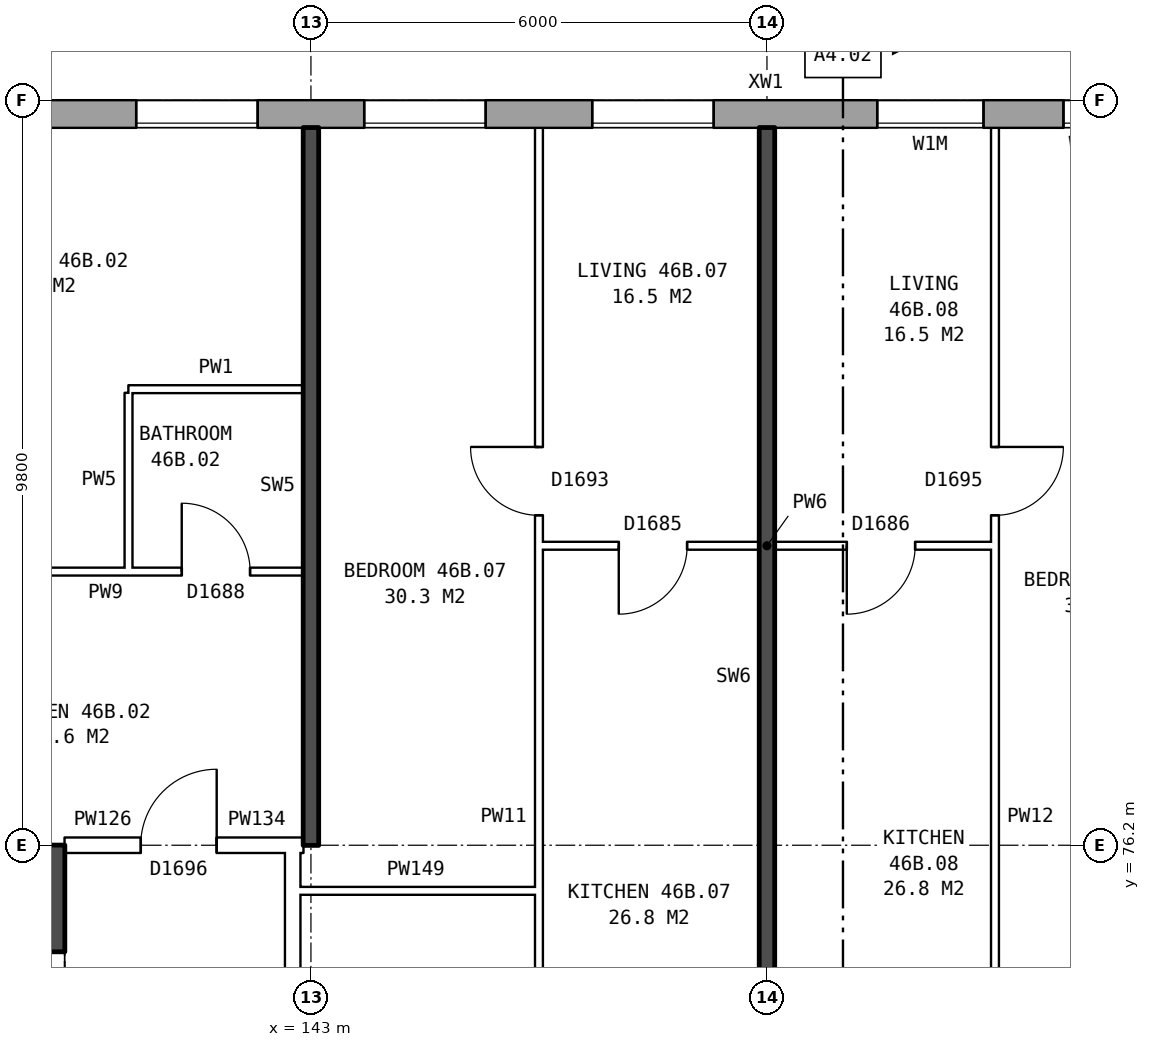
"""IFC4 building model, lengths in metres.
Left out: names, types, materials, properties, quantities, classifications, styles, units other than length and angle.
Written with IfcOpenShell. Run it as: python <this file> out.ifc"""

import sys

from ifc_helpers import new_model, si_unit, direction, frame, frame_2d, origin, place, context, subcontext, project, spatial, rectangle, extrude, element, fill, save


model = new_model("IFC4")
c1 = context("Model", 3, precision=1e-05, world=origin(), true_north=direction((0.0, 1.0)))
c2 = subcontext(c1, "Body", "Model", "MODEL_VIEW")
j1 = project(units=[si_unit("LENGTHUNIT", "METRE"), si_unit("PLANEANGLEUNIT", "RADIAN")], contexts=[c1])
p1 = place(None, origin())
s1 = spatial("IfcSite", under=j1, at=p1, CompositionType="ELEMENT")
p2 = place(p1, origin())
s2 = spatial("IfcBuilding", under=s1, at=p2, CompositionType="ELEMENT")
p3 = place(p2, frame((0.0, 0.0, 164.0)))
s3 = spatial("IfcBuildingStorey", under=s2, at=p3, CompositionType="ELEMENT", Elevation=164.0)
p4 = place(p3, frame((168.425, 85.82, 0.0), z_axis=(0.0, 0.0, 1.0), x_axis=(-1.0, 0.0, 0.0)))
e1 = element("IfcWall", 1, at=p4, inside=s3, PredefinedType="STANDARD", context=c2, shape_type="SweptSolid", body=[
    extrude(rectangle(XDim=34.351, YDim=0.36, at=frame_2d((17.175, 0.0))), origin(), (0.0, 0.0, 1.0), 2.85),
])
p5 = place(p4, frame((2.125, 0.0, 0.8)))
e2 = element("IfcOpeningElement", 2, at=p5, cuts=e1, PredefinedType="OPENING", context=c2, shape_type="SweptSolid", body=[
    extrude(rectangle(XDim=1.6, YDim=1.8, at=frame_2d((0.8, 0.9))), frame((0.0, 0.19, 0.0), z_axis=(0.0, -1.0, 0.0), x_axis=(1.0, 0.0, 0.0)), (0.0, 0.0, 1.0), 0.38),
])
p6 = place(p4, frame((5.125, 0.0, 0.8)))
e3 = element("IfcOpeningElement", 3, at=p6, cuts=e1, PredefinedType="OPENING", context=c2, shape_type="SweptSolid", body=[
    extrude(rectangle(XDim=1.6, YDim=1.8, at=frame_2d((0.8, 0.9))), frame((0.0, 0.19, 0.0), z_axis=(0.0, -1.0, 0.0), x_axis=(1.0, 0.0, 0.0)), (0.0, 0.0, 1.0), 0.38),
])
p7 = place(p4, frame((8.125, 0.0, 0.8)))
e4 = element("IfcOpeningElement", 4, at=p7, cuts=e1, PredefinedType="OPENING", context=c2, shape_type="SweptSolid", body=[
    extrude(rectangle(XDim=1.6, YDim=1.8, at=frame_2d((0.8, 0.9))), frame((0.0, 0.19, 0.0), z_axis=(0.0, -1.0, 0.0), x_axis=(1.0, 0.0, 0.0)), (0.0, 0.0, 1.0), 0.38),
])
p8 = place(p4, frame((11.125, 0.0, 0.8)))
e5 = element("IfcOpeningElement", 5, at=p8, cuts=e1, PredefinedType="OPENING", context=c2, shape_type="SweptSolid", body=[
    extrude(rectangle(XDim=1.6, YDim=1.8, at=frame_2d((0.8, 0.9))), frame((0.0, 0.19, 0.0), z_axis=(0.0, -1.0, 0.0), x_axis=(1.0, 0.0, 0.0)), (0.0, 0.0, 1.0), 0.38),
])
p9 = place(p4, frame((13.625, 0.0, 0.9)))
e6 = element("IfcOpeningElement", 6, at=p9, cuts=e1, PredefinedType="OPENING", context=c2, shape_type="SweptSolid", body=[
    extrude(rectangle(XDim=1.0, YDim=1.5, at=frame_2d((0.5, 0.75))), frame((0.0, 0.19, 0.0), z_axis=(0.0, -1.0, 0.0), x_axis=(1.0, 0.0, 0.0)), (0.0, 0.0, 1.0), 0.38),
])
p10 = place(p4, frame((16.575, 0.0, 0.25)))
e7 = element("IfcOpeningElement", 7, at=p10, cuts=e1, PredefinedType="OPENING", context=c2, shape_type="SweptSolid", body=[
    extrude(rectangle(XDim=1.4, YDim=1.2, at=frame_2d((0.7, 0.6))), frame((0.0, 0.19, 0.0), z_axis=(0.0, -1.0, 0.0), x_axis=(1.0, 0.0, 0.0)), (0.0, 0.0, 1.0), 0.38),
])
p11 = place(p4, frame((20.125, 0.0, 0.8)))
e8 = element("IfcOpeningElement", 8, at=p11, cuts=e1, PredefinedType="OPENING", context=c2, shape_type="SweptSolid", body=[
    extrude(rectangle(XDim=1.6, YDim=1.8, at=frame_2d((0.8, 0.9))), frame((0.0, 0.19, 0.0), z_axis=(0.0, -1.0, 0.0), x_axis=(1.0, 0.0, 0.0)), (0.0, 0.0, 1.0), 0.38),
])
p12 = place(p4, frame((23.125, 0.0, 0.8)))
e9 = element("IfcOpeningElement", 9, at=p12, cuts=e1, PredefinedType="OPENING", context=c2, shape_type="SweptSolid", body=[
    extrude(rectangle(XDim=1.6, YDim=1.8, at=frame_2d((0.8, 0.9))), frame((0.0, 0.19, 0.0), z_axis=(0.0, -1.0, 0.0), x_axis=(1.0, 0.0, 0.0)), (0.0, 0.0, 1.0), 0.38),
])
p13 = place(p4, frame((26.125, 0.0, 0.8)))
e10 = element("IfcOpeningElement", 10, at=p13, cuts=e1, PredefinedType="OPENING", context=c2, shape_type="SweptSolid", body=[
    extrude(rectangle(XDim=1.6, YDim=1.8, at=frame_2d((0.8, 0.9))), frame((0.0, 0.19, 0.0), z_axis=(0.0, -1.0, 0.0), x_axis=(1.0, 0.0, 0.0)), (0.0, 0.0, 1.0), 0.38),
])
p14 = place(p4, frame((29.125, 0.0, 0.8)))
e11 = element("IfcOpeningElement", 11, at=p14, cuts=e1, PredefinedType="OPENING", context=c2, shape_type="SweptSolid", body=[
    extrude(rectangle(XDim=1.6, YDim=1.8, at=frame_2d((0.8, 0.9))), frame((0.0, 0.19, 0.0), z_axis=(0.0, -1.0, 0.0), x_axis=(1.0, 0.0, 0.0)), (0.0, 0.0, 1.0), 0.38),
])
p15 = place(p4, frame((32.125, 0.0, 0.8)))
e12 = element("IfcOpeningElement", 12, at=p15, cuts=e1, PredefinedType="OPENING", context=c2, shape_type="SweptSolid", body=[
    extrude(rectangle(XDim=1.6, YDim=1.8, at=frame_2d((0.8, 0.9))), frame((0.0, 0.19, 0.0), z_axis=(0.0, -1.0, 0.0), x_axis=(1.0, 0.0, 0.0)), (0.0, 0.0, 1.0), 0.38),
])
p16 = place(p4, frame((14.925, 0.0, 1.7)))
e13 = element("IfcOpeningElement", 13, at=p16, cuts=e1, PredefinedType="OPENING", context=c2, shape_type="SweptSolid", body=[
    extrude(rectangle(XDim=0.6, YDim=0.9, at=frame_2d((0.3, 0.45))), frame((0.0, 0.19, 0.0), z_axis=(0.0, -1.0, 0.0), x_axis=(1.0, 0.0, 0.0)), (0.0, 0.0, 1.0), 0.38),
])
p17 = place(p3, frame((139.51, 63.8, 0.0), z_axis=(0.0, 0.0, 1.0), x_axis=(0.0, 1.0, 0.0)))
e14 = element("IfcWall", 14, at=p17, inside=s3, PredefinedType="SHEAR", context=c2, shape_type="SweptSolid", body=[
    extrude(rectangle(XDim=12.4, YDim=0.5, at=frame_2d((6.2, 0.0))), origin(), (0.0, 0.0, 1.0), 2.85),
])
p18 = place(p17, frame((1.325, 0.0, 0.0)))
e15 = element("IfcOpeningElement", 15, at=p18, cuts=e14, PredefinedType="OPENING", context=c2, shape_type="SweptSolid", body=[
    extrude(rectangle(XDim=1.1, YDim=2.1, at=frame_2d((0.55, 1.05))), frame((0.0, 0.26, 0.0), z_axis=(0.0, -1.0, 0.0), x_axis=(1.0, 0.0, 0.0)), (0.0, 0.0, 1.0), 0.52),
])
p19 = place(p17, frame((3.6, 0.0, 0.0)))
e16 = element("IfcOpeningElement", 16, at=p19, cuts=e14, PredefinedType="OPENING", context=c2, shape_type="SweptSolid", body=[
    extrude(rectangle(XDim=1.1, YDim=2.1, at=frame_2d((0.55, 1.05))), frame((0.0, 0.26, 0.0), z_axis=(0.0, -1.0, 0.0), x_axis=(1.0, 0.0, 0.0)), (0.0, 0.0, 1.0), 0.52),
])
p20 = place(p17, frame((5.8, 0.0, 0.0)))
e17 = element("IfcOpeningElement", 17, at=p20, cuts=e14, PredefinedType="OPENING", context=c2, shape_type="SweptSolid", body=[
    extrude(rectangle(XDim=1.1, YDim=2.1, at=frame_2d((0.55, 1.05))), frame((0.0, 0.26, 0.0), z_axis=(0.0, -1.0, 0.0), x_axis=(1.0, 0.0, 0.0)), (0.0, 0.0, 1.0), 0.52),
])
p21 = place(p17, frame((9.9, 0.0, 0.0)))
e18 = element("IfcOpeningElement", 18, at=p21, cuts=e14, PredefinedType="OPENING", context=c2, shape_type="SweptSolid", body=[
    extrude(rectangle(XDim=1.1, YDim=2.1, at=frame_2d((0.55, 1.05))), frame((0.0, 0.26, 0.0), z_axis=(0.0, -1.0, 0.0), x_axis=(1.0, 0.0, 0.0)), (0.0, 0.0, 1.0), 0.52),
])
p22 = place(p17, frame((8.125, 0.0, 0.0)))
e19 = element("IfcOpeningElement", 19, at=p22, cuts=e14, PredefinedType="OPENING", context=c2, shape_type="SweptSolid", body=[
    extrude(rectangle(XDim=0.85, YDim=2.1, at=frame_2d((0.425, 1.05))), frame((0.0, 0.26, 0.0), z_axis=(0.0, -1.0, 0.0), x_axis=(1.0, 0.0, 0.0)), (0.0, 0.0, 1.0), 0.52),
])
p23 = place(p3, frame((142.76, 63.9, 0.0), z_axis=(0.0, 0.0, 1.0), x_axis=(0.0, 1.0, 0.0)))
e20 = element("IfcWall", 20, at=p23, inside=s3, PredefinedType="PARTITIONING", context=c2, shape_type="SweptSolid", body=[
    extrude(rectangle(XDim=12.2, YDim=0.2, at=frame_2d((6.1, 0.0))), origin(), (0.0, 0.0, 1.0), 2.85),
])
p24 = place(p23, frame((5.1, 0.0, 0.0)))
e21 = element("IfcOpeningElement", 21, at=p24, cuts=e20, PredefinedType="OPENING", context=c2, shape_type="SweptSolid", body=[
    extrude(rectangle(XDim=2.0, YDim=2.1, at=frame_2d((1.0, 1.05))), frame((0.0, 0.11, 0.0), z_axis=(0.0, -1.0, 0.0), x_axis=(1.0, 0.0, 0.0)), (0.0, 0.0, 1.0), 0.22),
])
p25 = place(p3, frame((142.76, 75.6, 0.0), z_axis=(0.0, 0.0, 1.0), x_axis=(1.0, 0.0, 0.0)))
e22 = element("IfcWall", 22, at=p25, inside=s3, PredefinedType="PARTITIONING", context=c2, shape_type="SweptSolid", body=[
    extrude(rectangle(XDim=3.24, YDim=0.1, at=frame_2d((1.62, 0.0))), origin(), (0.0, 0.0, 1.0), 2.85),
])
p26 = place(p3, frame((139.76, 76.2, 0.0), z_axis=(0.0, 0.0, 1.0), x_axis=(1.0, 0.0, 0.0)))
e23 = element("IfcWall", 23, at=p26, inside=s3, PredefinedType="PARTITIONING", context=c2, shape_type="SweptSolid", body=[
    extrude(rectangle(XDim=3.0, YDim=0.2, at=frame_2d((1.5, 0.0))), origin(), (0.0, 0.0, 1.0), 2.85),
])
p27 = place(p26, frame((1.0, 0.0, 0.0)))
e24 = element("IfcOpeningElement", 24, at=p27, cuts=e23, PredefinedType="OPENING", context=c2, shape_type="SweptSolid", body=[
    extrude(rectangle(XDim=1.0, YDim=2.1, at=frame_2d((0.5, 1.05))), frame((0.0, 0.11, 0.0), z_axis=(0.0, -1.0, 0.0), x_axis=(1.0, 0.0, 0.0)), (0.0, 0.0, 1.0), 0.22),
])
p28 = place(p3, frame((142.76, 76.2, 0.0), z_axis=(0.0, 0.0, 1.0), x_axis=(1.0, 0.0, 0.0)))
e25 = element("IfcWall", 25, at=p28, inside=s3, PredefinedType="PARTITIONING", context=c2, shape_type="SweptSolid", body=[
    extrude(rectangle(XDim=0.14, YDim=0.2, at=frame_2d((0.07, 0.0))), origin(), (0.0, 0.0, 1.0), 2.85),
])
p29 = place(p3, frame((137.1, 79.8, 0.0), z_axis=(0.0, 0.0, 1.0), x_axis=(1.0, 0.0, 0.0)))
e26 = element("IfcWall", 26, at=p29, inside=s3, PredefinedType="PARTITIONING", context=c2, shape_type="SweptSolid", body=[
    extrude(rectangle(XDim=5.8, YDim=0.1, at=frame_2d((2.9, 0.0))), origin(), (0.0, 0.0, 1.0), 2.85),
])
p30 = place(p29, frame((1.3, 0.0, 0.0)))
e27 = element("IfcOpeningElement", 27, at=p30, cuts=e26, PredefinedType="OPENING", context=c2, shape_type="SweptSolid", body=[
    extrude(rectangle(XDim=0.9, YDim=2.1, at=frame_2d((0.45, 1.05))), frame((0.0, 0.06, 0.0), z_axis=(0.0, -1.0, 0.0), x_axis=(1.0, 0.0, 0.0)), (0.0, 0.0, 1.0), 0.12),
])
p31 = place(p29, frame((4.2, 0.0, 0.0)))
e28 = element("IfcOpeningElement", 28, at=p31, cuts=e26, PredefinedType="OPENING", context=c2, shape_type="SweptSolid", body=[
    extrude(rectangle(XDim=0.9, YDim=2.1, at=frame_2d((0.45, 1.05))), frame((0.0, 0.06, 0.0), z_axis=(0.0, -1.0, 0.0), x_axis=(1.0, 0.0, 0.0)), (0.0, 0.0, 1.0), 0.12),
])
p32 = place(p3, frame((146.0, 80.14, 0.0), z_axis=(0.0, 0.0, 1.0), x_axis=(1.0, 0.0, 0.0)))
e29 = element("IfcWall", 29, at=p32, inside=s3, PredefinedType="PARTITIONING", context=c2, shape_type="SweptSolid", body=[
    extrude(rectangle(XDim=6.0, YDim=0.1, at=frame_2d((3.0, 0.0))), origin(), (0.0, 0.0, 1.0), 2.85),
])
p33 = place(p32, frame((1.05, 0.0, 0.0)))
e30 = element("IfcOpeningElement", 30, at=p33, cuts=e29, PredefinedType="OPENING", context=c2, shape_type="SweptSolid", body=[
    extrude(rectangle(XDim=0.9, YDim=2.1, at=frame_2d((0.45, 1.05))), frame((0.0, 0.06, 0.0), z_axis=(0.0, -1.0, 0.0), x_axis=(1.0, 0.0, 0.0)), (0.0, 0.0, 1.0), 0.12),
])
p34 = place(p32, frame((4.05, 0.0, 0.0)))
e31 = element("IfcOpeningElement", 31, at=p34, cuts=e29, PredefinedType="OPENING", context=c2, shape_type="SweptSolid", body=[
    extrude(rectangle(XDim=0.9, YDim=2.1, at=frame_2d((0.45, 1.05))), frame((0.0, 0.06, 0.0), z_axis=(0.0, -1.0, 0.0), x_axis=(1.0, 0.0, 0.0)), (0.0, 0.0, 1.0), 0.12),
])
for number, where, z_axis, x_axis in (
    (32, (140.6, 82.2, 0.0), (0.0, 0.0, 1.0), (1.0, 0.0, 0.0)),
    (33, (140.6, 79.85, 0.0), (0.0, 0.0, 1.0), (0.0, 1.0, 0.0)),
):
    element("IfcWall", number, at=place(p3, frame(where, z_axis=z_axis, x_axis=x_axis)), inside=s3, PredefinedType="PARTITIONING", context=c2, shape_type="SweptSolid", body=[
        extrude(rectangle(XDim=2.3, YDim=0.1, at=frame_2d((1.15, 0.0))), origin(), (0.0, 0.0, 1.0), 2.85),
    ])
p35 = place(p3, frame((143.0, 76.2, 0.0), z_axis=(0.0, 0.0, 1.0), x_axis=(0.0, 1.0, 0.0)))
e34 = element("IfcWall", 34, at=p35, inside=s3, PredefinedType="SOLIDWALL", context=c2, shape_type="SweptSolid", body=[
    extrude(rectangle(XDim=9.44, YDim=0.2, at=frame_2d((4.72, 0.0))), origin(), (0.0, 0.0, 1.0), 2.85),
])
p36 = place(p3, frame((146.0, 71.3, 0.0), z_axis=(0.0, 0.0, 1.0), x_axis=(0.0, 1.0, 0.0)))
e35 = element("IfcWall", 35, at=p36, inside=s3, PredefinedType="PARTITIONING", context=c2, shape_type="SweptSolid", body=[
    extrude(rectangle(XDim=14.34, YDim=0.1, at=frame_2d((7.17, 0.0))), origin(), (0.0, 0.0, 1.0), 2.85),
])
p37 = place(p36, frame((9.24, 0.0, 0.0)))
e36 = element("IfcOpeningElement", 36, at=p37, cuts=e35, PredefinedType="OPENING", context=c2, shape_type="SweptSolid", body=[
    extrude(rectangle(XDim=0.9, YDim=2.1, at=frame_2d((0.45, 1.05))), frame((0.0, 0.06, 0.0), z_axis=(0.0, -1.0, 0.0), x_axis=(1.0, 0.0, 0.0)), (0.0, 0.0, 1.0), 0.12),
])
p38 = place(p36, frame((0.4, 0.0, 0.0)))
e37 = element("IfcOpeningElement", 37, at=p38, cuts=e35, PredefinedType="OPENING", context=c2, shape_type="SweptSolid", body=[
    extrude(rectangle(XDim=0.9, YDim=2.1, at=frame_2d((0.45, 1.05))), frame((0.0, 0.06, 0.0), z_axis=(0.0, -1.0, 0.0), x_axis=(1.0, 0.0, 0.0)), (0.0, 0.0, 1.0), 0.12),
])
p39 = place(p3, frame((149.0, 71.2, 0.0), z_axis=(0.0, 0.0, 1.0), x_axis=(0.0, 1.0, 0.0)))
e38 = element("IfcWall", 38, at=p39, inside=s3, PredefinedType="SOLIDWALL", context=c2, shape_type="SweptSolid", body=[
    extrude(rectangle(XDim=14.44, YDim=0.2, at=frame_2d((7.22, 0.0))), origin(), (0.0, 0.0, 1.0), 2.85),
])
p40 = place(p3, frame((152.0, 71.3, 0.0), z_axis=(0.0, 0.0, 1.0), x_axis=(0.0, 1.0, 0.0)))
e39 = element("IfcWall", 39, at=p40, inside=s3, PredefinedType="PARTITIONING", context=c2, shape_type="SweptSolid", body=[
    extrude(rectangle(XDim=14.34, YDim=0.1, at=frame_2d((7.17, 0.0))), origin(), (0.0, 0.0, 1.0), 2.85),
])
p41 = place(p40, frame((9.24, 0.0, 0.0)))
e40 = element("IfcOpeningElement", 40, at=p41, cuts=e39, PredefinedType="OPENING", context=c2, shape_type="SweptSolid", body=[
    extrude(rectangle(XDim=0.9, YDim=2.1, at=frame_2d((0.45, 1.05))), frame((0.0, 0.06, 0.0), z_axis=(0.0, -1.0, 0.0), x_axis=(1.0, 0.0, 0.0)), (0.0, 0.0, 1.0), 0.12),
])
p42 = place(p40, frame((0.4, 0.0, 0.0)))
e41 = element("IfcOpeningElement", 41, at=p42, cuts=e39, PredefinedType="OPENING", context=c2, shape_type="SweptSolid", body=[
    extrude(rectangle(XDim=0.9, YDim=2.1, at=frame_2d((0.45, 1.05))), frame((0.0, 0.06, 0.0), z_axis=(0.0, -1.0, 0.0), x_axis=(1.0, 0.0, 0.0)), (0.0, 0.0, 1.0), 0.12),
])
p43 = place(p10, origin())
e42 = element("IfcWindow", 42, at=p43, inside=s3, PartitioningType="SINGLE_PANEL", PredefinedType="WINDOW", context=c2, shape_type="SweptSolid", body=[
    extrude(rectangle(XDim=1.4, YDim=1.2, at=frame_2d((0.7, 0.6))), frame((0.0, 0.15, 0.0), z_axis=(0.0, -1.0, 0.0), x_axis=(1.0, 0.0, 0.0)), (0.0, 0.0, 1.0), 0.06),
])
fill(e7, e42)
p44 = place(p11, origin())
e43 = element("IfcWindow", 43, at=p44, inside=s3, PartitioningType="SINGLE_PANEL", PredefinedType="WINDOW", context=c2, shape_type="SweptSolid", body=[
    extrude(rectangle(XDim=1.6, YDim=1.8, at=frame_2d((0.8, 0.9))), frame((0.0, 0.15, 0.0), z_axis=(0.0, -1.0, 0.0), x_axis=(1.0, 0.0, 0.0)), (0.0, 0.0, 1.0), 0.06),
])
fill(e8, e43)
p45 = place(p12, origin())
e44 = element("IfcWindow", 44, at=p45, inside=s3, PartitioningType="SINGLE_PANEL", PredefinedType="WINDOW", context=c2, shape_type="SweptSolid", body=[
    extrude(rectangle(XDim=1.6, YDim=1.8, at=frame_2d((0.8, 0.9))), frame((0.0, 0.15, 0.0), z_axis=(0.0, -1.0, 0.0), x_axis=(1.0, 0.0, 0.0)), (0.0, 0.0, 1.0), 0.06),
])
fill(e9, e44)
p46 = place(p13, origin())
e45 = element("IfcWindow", 45, at=p46, inside=s3, PartitioningType="SINGLE_PANEL", PredefinedType="WINDOW", context=c2, shape_type="SweptSolid", body=[
    extrude(rectangle(XDim=1.6, YDim=1.8, at=frame_2d((0.8, 0.9))), frame((0.0, 0.15, 0.0), z_axis=(0.0, -1.0, 0.0), x_axis=(1.0, 0.0, 0.0)), (0.0, 0.0, 1.0), 0.06),
])
fill(e10, e45)
p47 = place(p27, origin())
e46 = element("IfcDoor", 46, at=p47, inside=s3, OperationType="SINGLE_SWING_RIGHT", PredefinedType="DOOR", context=c2, shape_type="SweptSolid", body=[
    extrude(rectangle(XDim=1.0, YDim=2.1, at=frame_2d((0.5, 1.05))), frame((0.0, 0.025, 0.0), z_axis=(0.0, -1.0, 0.0), x_axis=(1.0, 0.0, 0.0)), (0.0, 0.0, 1.0), 0.05),
])
fill(e24, e46)
p48 = place(p31, origin())
e47 = element("IfcDoor", 47, at=p48, inside=s3, OperationType="SINGLE_SWING_LEFT", PredefinedType="DOOR", context=c2, shape_type="SweptSolid", body=[
    extrude(rectangle(XDim=0.9, YDim=2.1, at=frame_2d((0.45, 1.05))), frame((0.0, 0.025, 0.0), z_axis=(0.0, -1.0, 0.0), x_axis=(1.0, 0.0, 0.0)), (0.0, 0.0, 1.0), 0.05),
])
fill(e28, e47)
p49 = place(p37, origin())
e48 = element("IfcDoor", 48, at=p49, inside=s3, OperationType="SINGLE_SWING_RIGHT", PredefinedType="DOOR", context=c2, shape_type="SweptSolid", body=[
    extrude(rectangle(XDim=0.9, YDim=2.1, at=frame_2d((0.45, 1.05))), frame((0.0, 0.025, 0.0), z_axis=(0.0, -1.0, 0.0), x_axis=(1.0, 0.0, 0.0)), (0.0, 0.0, 1.0), 0.05),
])
fill(e36, e48)
p50 = place(p33, frame((0.9, 0.0, 0.0), z_axis=(0.0, 0.0, 1.0), x_axis=(-1.0, 0.0, 0.0)))
e49 = element("IfcDoor", 49, at=p50, inside=s3, OperationType="SINGLE_SWING_RIGHT", PredefinedType="DOOR", context=c2, shape_type="SweptSolid", body=[
    extrude(rectangle(XDim=0.9, YDim=2.1, at=frame_2d((0.45, 1.05))), frame((0.0, 0.025, 0.0), z_axis=(0.0, -1.0, 0.0), x_axis=(1.0, 0.0, 0.0)), (0.0, 0.0, 1.0), 0.05),
])
fill(e30, e49)
p51 = place(p41, frame((0.9, 0.0, 0.0), z_axis=(0.0, 0.0, 1.0), x_axis=(-1.0, 0.0, 0.0)))
e50 = element("IfcDoor", 50, at=p51, inside=s3, OperationType="SINGLE_SWING_LEFT", PredefinedType="DOOR", context=c2, shape_type="SweptSolid", body=[
    extrude(rectangle(XDim=0.9, YDim=2.1, at=frame_2d((0.45, 1.05))), frame((0.0, 0.025, 0.0), z_axis=(0.0, -1.0, 0.0), x_axis=(1.0, 0.0, 0.0)), (0.0, 0.0, 1.0), 0.05),
])
fill(e40, e50)
p52 = place(p34, frame((0.9, 0.0, 0.0), z_axis=(0.0, 0.0, 1.0), x_axis=(-1.0, 0.0, 0.0)))
e51 = element("IfcDoor", 51, at=p52, inside=s3, OperationType="SINGLE_SWING_RIGHT", PredefinedType="DOOR", context=c2, shape_type="SweptSolid", body=[
    extrude(rectangle(XDim=0.9, YDim=2.1, at=frame_2d((0.45, 1.05))), frame((0.0, 0.025, 0.0), z_axis=(0.0, -1.0, 0.0), x_axis=(1.0, 0.0, 0.0)), (0.0, 0.0, 1.0), 0.05),
])
fill(e31, e51)
p53 = place(p16, origin())
e52 = element("IfcWindow", 52, at=p53, inside=s3, PartitioningType="SINGLE_PANEL", PredefinedType="WINDOW", context=c2, shape_type="SweptSolid", body=[
    extrude(rectangle(XDim=0.6, YDim=0.9, at=frame_2d((0.3, 0.45))), frame((0.0, 0.15, 0.0), z_axis=(0.0, -1.0, 0.0), x_axis=(1.0, 0.0, 0.0)), (0.0, 0.0, 1.0), 0.06),
])
fill(e13, e52)
save(model, sys.argv[1])
